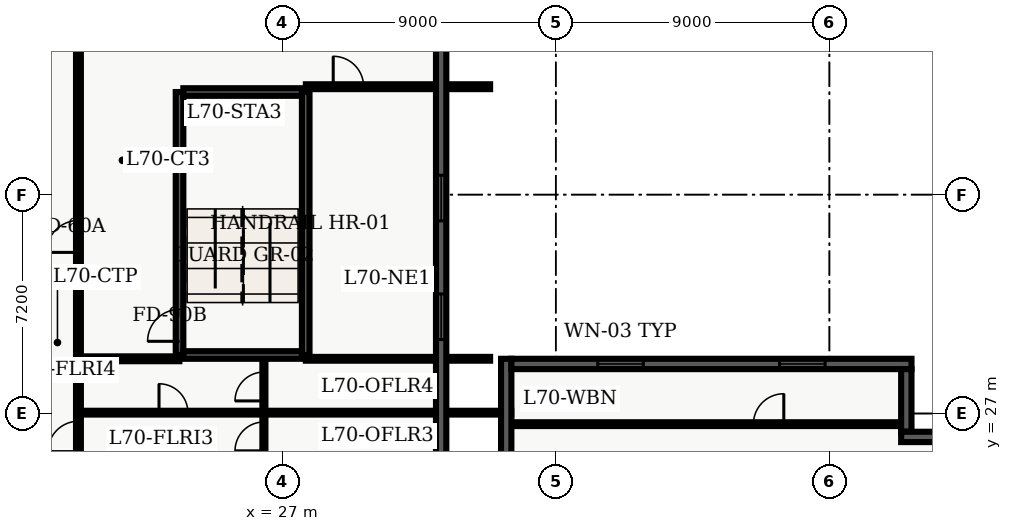
"""IFC4 building model, lengths in metres.
Left out: names, types, materials, properties, quantities, classifications, styles, units other than length and angle.
Written with IfcOpenShell. Run it as: python <this file> out.ifc"""

import sys

from ifc_helpers import new_model, entity, si_unit, converted_unit, direction, frame, origin_with_axes, origin_2d_with_axis, place, context, subcontext, project, spatial, polyline, rectangle, outline, extrude, element, fill, save


model = new_model("IFC4")
c1 = context("Model", 3, precision=1e-05, world=origin_with_axes(), true_north=direction((0.0, 1.0)))
c2 = subcontext(c1, "Body", "Model", "MODEL_VIEW")
j1 = project(units=[si_unit("LENGTHUNIT", "METRE"), converted_unit("PLANEANGLEUNIT", "DEGREE", entity("IfcPlaneAngleMeasure", 0.017), si_unit("PLANEANGLEUNIT", "RADIAN"), dimensions=[0, 0, 0, 0, 0, 0, 0])], contexts=[c1])
p1 = place(None, origin_with_axes())
s1 = spatial("IfcSite", under=j1, at=p1, CompositionType="ELEMENT")
p2 = place(p1, origin_with_axes())
s2 = spatial("IfcBuilding", under=s1, at=p2, CompositionType="ELEMENT")
p3 = place(p2, frame((0.0, 0.0, 284.1), z_axis=(0.0, 0.0, 1.0), x_axis=(1.0, 0.0, 0.0)))
s3 = spatial("IfcBuildingStorey", under=s2, at=p3, CompositionType="ELEMENT", Elevation=284.1)
p4 = place(p3, frame((23.625, 28.925, 0.0), z_axis=(0.0, 0.0, 1.0), x_axis=(0.0, 1.0, 0.0)))
e1 = element("IfcWall", 1, at=p4, inside=s3, PredefinedType="SHEAR", context=c2, shape_type="SweptSolid", body=[
    extrude(outline(polyline([(0.0, -0.125), (8.65, -0.125), (8.65, 0.125), (0.0, 0.125), (0.0, -0.125)])), origin_with_axes(), (0.0, 0.0, 1.0), 3.6),
])
p5 = place(p4, frame((0.975, 0.0, 0.0), z_axis=(0.0, 0.0, 1.0), x_axis=(1.0, 0.0, 0.0)))
e2 = element("IfcOpeningElement", 2, at=p5, cuts=e1, PredefinedType="OPENING", context=c2, shape_type="SweptSolid", body=[
    extrude(rectangle(XDim=1.05, YDim=0.27, at=origin_2d_with_axis()), origin_with_axes(), (0.0, 0.0, 1.0), 2.15),
])
p6 = place(p3, frame((27.775, 28.925, 0.0), z_axis=(0.0, 0.0, 1.0), x_axis=(0.0, 1.0, 0.0)))
e3 = element("IfcWall", 3, at=p6, inside=s3, PredefinedType="SHEAR", context=c2, shape_type="SweptSolid", body=[
    extrude(outline(polyline([(0.0, -0.125), (8.65, -0.125), (8.65, 0.125), (0.0, 0.125), (0.0, -0.125)])), origin_with_axes(), (0.0, 0.0, 1.0), 3.6),
])
for number, where, z_axis, x_axis in (
    (4, (23.75, 28.925, 0.0), (0.0, 0.0, 1.0), (1.0, 0.0, 0.0)),
    (5, (23.75, 37.575, 0.0), (0.0, 0.0, 1.0), (1.0, 0.0, 0.0)),
):
    element("IfcWall", number, at=place(p3, frame(where, z_axis=z_axis, x_axis=x_axis)), inside=s3, PredefinedType="SHEAR", context=c2, shape_type="SweptSolid", body=[
        extrude(outline(polyline([(0.0, -0.125), (3.9, -0.125), (3.9, 0.125), (0.0, 0.125), (0.0, -0.125)])), origin_with_axes(), (0.0, 0.0, 1.0), 3.6),
    ])
p7 = place(p3, frame((20.3, 7.8, 0.0), z_axis=(0.0, 0.0, 1.0), x_axis=(0.0, 1.0, 0.0)))
e6 = element("IfcWall", 6, at=p7, inside=s3, PredefinedType="PARTITIONING", context=c2, shape_type="SweptSolid", body=[
    extrude(outline(polyline([(0.0, -0.08), (32.7, -0.08), (32.7, 0.08), (0.0, 0.08), (0.0, -0.08)])), origin_with_axes(), (0.0, 0.0, 1.0), 2.64),
])
p8 = place(p7, frame((25.025, 0.0, 0.0), z_axis=(0.0, 0.0, 1.0), x_axis=(1.0, 0.0, 0.0)))
e7 = element("IfcOpeningElement", 7, at=p8, cuts=e6, PredefinedType="OPENING", context=c2, shape_type="SweptSolid", body=[
    extrude(rectangle(XDim=1.05, YDim=0.18, at=origin_2d_with_axis()), origin_with_axes(), (0.0, 0.0, 1.0), 2.15),
])
p9 = place(p7, frame((14.273, 0.0, 0.0), z_axis=(0.0, 0.0, 1.0), x_axis=(1.0, 0.0, 0.0)))
e8 = element("IfcOpeningElement", 8, at=p9, cuts=e6, PredefinedType="OPENING", context=c2, shape_type="SweptSolid", body=[
    extrude(rectangle(XDim=1.0, YDim=0.18, at=origin_2d_with_axis()), origin_with_axes(), (0.0, 0.0, 1.0), 2.15),
])
p10 = place(p7, frame((18.447, 0.0, 0.0), z_axis=(0.0, 0.0, 1.0), x_axis=(1.0, 0.0, 0.0)))
e9 = element("IfcOpeningElement", 9, at=p10, cuts=e6, PredefinedType="OPENING", context=c2, shape_type="SweptSolid", body=[
    extrude(rectangle(XDim=1.0, YDim=0.18, at=origin_2d_with_axis()), origin_with_axes(), (0.0, 0.0, 1.0), 2.15),
])
p11 = place(p7, frame((6.675, 0.0, 0.0), z_axis=(0.0, 0.0, 1.0), x_axis=(1.0, 0.0, 0.0)))
e10 = element("IfcOpeningElement", 10, at=p11, cuts=e6, PredefinedType="OPENING", context=c2, shape_type="SweptSolid", body=[
    extrude(rectangle(XDim=1.05, YDim=0.18, at=origin_2d_with_axis()), origin_with_axes(), (0.0, 0.0, 1.0), 2.15),
])
p12 = place(p3, frame((20.3, 28.8, 0.0), z_axis=(0.0, 0.0, 1.0), x_axis=(1.0, 0.0, 0.0)))
e11 = element("IfcWall", 11, at=p12, inside=s3, PredefinedType="PARTITIONING", context=c2, shape_type="SweptSolid", body=[
    extrude(outline(polyline([(0.0, -0.08), (3.32, -0.08), (3.32, 0.08), (0.0, 0.08), (0.0, -0.08)])), origin_with_axes(), (0.0, 0.0, 1.0), 2.64),
])
p13 = place(p3, frame((26.4, 21.42, 0.0), z_axis=(0.0, 0.0, 1.0), x_axis=(0.0, 1.0, 0.0)))
e12 = element("IfcWall", 12, at=p13, inside=s3, PredefinedType="PARTITIONING", context=c2, shape_type="SweptSolid", body=[
    extrude(outline(polyline([(0.0, -0.05), (7.26, -0.05), (7.26, 0.05), (0.0, 0.05), (0.0, -0.05)])), origin_with_axes(), (0.0, 0.0, 1.0), 2.64),
])
p14 = place(p13, frame((0.932, 0.0, 0.0), z_axis=(0.0, 0.0, 1.0), x_axis=(1.0, 0.0, 0.0)))
e13 = element("IfcOpeningElement", 13, at=p14, cuts=e12, PredefinedType="OPENING", context=c2, shape_type="SweptSolid", body=[
    extrude(rectangle(XDim=0.95, YDim=0.12, at=origin_2d_with_axis()), origin_with_axes(), (0.0, 0.0, 1.0), 2.15),
])
p15 = place(p13, frame((2.99, 0.0, 0.0), z_axis=(0.0, 0.0, 1.0), x_axis=(1.0, 0.0, 0.0)))
e14 = element("IfcOpeningElement", 14, at=p15, cuts=e12, PredefinedType="OPENING", context=c2, shape_type="SweptSolid", body=[
    extrude(rectangle(XDim=0.95, YDim=0.12, at=origin_2d_with_axis()), origin_with_axes(), (0.0, 0.0, 1.0), 2.15),
])
p16 = place(p13, frame((4.827, 0.0, 0.0), z_axis=(0.0, 0.0, 1.0), x_axis=(1.0, 0.0, 0.0)))
e15 = element("IfcOpeningElement", 15, at=p16, cuts=e12, PredefinedType="OPENING", context=c2, shape_type="SweptSolid", body=[
    extrude(rectangle(XDim=0.95, YDim=0.12, at=origin_2d_with_axis()), origin_with_axes(), (0.0, 0.0, 1.0), 2.15),
])
p17 = place(p13, frame((6.469, 0.0, 0.0), z_axis=(0.0, 0.0, 1.0), x_axis=(1.0, 0.0, 0.0)))
e16 = element("IfcOpeningElement", 16, at=p17, cuts=e12, PredefinedType="OPENING", context=c2, shape_type="SweptSolid", body=[
    extrude(rectangle(XDim=0.95, YDim=0.12, at=origin_2d_with_axis()), origin_with_axes(), (0.0, 0.0, 1.0), 2.15),
])
p18 = place(p3, frame((20.45, 27.028, 0.0), z_axis=(0.0, 0.0, 1.0), x_axis=(1.0, 0.0, 0.0)))
e17 = element("IfcWall", 17, at=p18, inside=s3, PredefinedType="PARTITIONING", context=c2, shape_type="SweptSolid", body=[
    extrude(outline(polyline([(0.0, -0.062), (14.085, -0.062), (14.085, 0.062), (0.0, 0.062), (0.0, -0.062)])), origin_with_axes(), (0.0, 0.0, 1.0), 2.64),
])
p19 = place(p18, frame((2.975, 0.0, 0.0), z_axis=(0.0, 0.0, 1.0), x_axis=(1.0, 0.0, 0.0)))
e18 = element("IfcOpeningElement", 18, at=p19, cuts=e17, PredefinedType="OPENING", context=c2, shape_type="SweptSolid", body=[
    extrude(rectangle(XDim=0.95, YDim=0.145, at=origin_2d_with_axis()), origin_with_axes(), (0.0, 0.0, 1.0), 2.15),
])
p20 = place(p3, frame((27.78, 28.8, 0.0), z_axis=(0.0, 0.0, 1.0), x_axis=(1.0, 0.0, 0.0)))
e19 = element("IfcWall", 19, at=p20, inside=s3, PredefinedType="PARTITIONING", context=c2, shape_type="SweptSolid", body=[
    extrude(outline(polyline([(0.0, -0.062), (6.06, -0.062), (6.06, 0.062), (0.0, 0.062), (0.0, -0.062)])), origin_with_axes(), (0.0, 0.0, 1.0), 2.64),
])
p21 = place(p3, frame((27.78, 37.75, 0.0), z_axis=(0.0, 0.0, 1.0), x_axis=(1.0, 0.0, 0.0)))
e20 = element("IfcWall", 20, at=p21, inside=s3, PredefinedType="PARTITIONING", context=c2, shape_type="SweptSolid", body=[
    extrude(outline(polyline([(0.0, -0.08), (6.06, -0.08), (6.06, 0.08), (0.0, 0.08), (0.0, -0.08)])), origin_with_axes(), (0.0, 0.0, 1.0), 2.64),
])
p22 = place(p21, frame((1.4, 0.0, 0.0), z_axis=(0.0, 0.0, 1.0), x_axis=(1.0, 0.0, 0.0)))
e21 = element("IfcOpeningElement", 21, at=p22, cuts=e20, PredefinedType="OPENING", context=c2, shape_type="SweptSolid", body=[
    extrude(rectangle(XDim=1.0, YDim=0.18, at=origin_2d_with_axis()), origin_with_axes(), (0.0, 0.0, 1.0), 2.15),
])
p23 = place(p3, frame((34.535, 26.65, 0.0), z_axis=(0.0, 0.0, 1.0), x_axis=(1.0, 0.0, 0.0)))
e22 = element("IfcWall", 22, at=p23, inside=s3, PredefinedType="PARTITIONING", context=c2, shape_type="SweptSolid", body=[
    extrude(outline(polyline([(0.0, -0.062), (12.995, -0.062), (12.995, 0.062), (0.0, 0.062), (0.0, -0.062)])), origin_with_axes(), (0.0, 0.0, 1.0), 2.64),
])
p24 = place(p23, frame((8.465, 0.0, 0.0), z_axis=(0.0, 0.0, 1.0), x_axis=(1.0, 0.0, 0.0)))
e23 = element("IfcOpeningElement", 23, at=p24, cuts=e22, PredefinedType="OPENING", context=c2, shape_type="SweptSolid", body=[
    extrude(rectangle(XDim=1.0, YDim=0.145, at=origin_2d_with_axis()), origin_with_axes(), (0.0, 0.0, 1.0), 2.15),
])
p25 = place(p3, frame((34.37, 21.26, 0.0), z_axis=(0.0, 0.0, 1.0), x_axis=(0.0, 1.0, 0.0)))
e24 = element("IfcWall", 24, at=p25, inside=s3, PredefinedType="SOLIDWALL", context=c2, shape_type="SweptSolid", body=[
    extrude(outline(polyline([(0.0, -0.17), (7.54, -0.17), (7.54, 0.17), (0.0, 0.17), (0.0, -0.17)])), origin_with_axes(), (0.0, 0.0, 1.0), 3.6),
])
p26 = place(p3, frame((34.54, 28.63, 0.0), z_axis=(0.0, 0.0, 1.0), x_axis=(1.0, 0.0, 0.0)))
e25 = element("IfcWall", 25, at=p26, inside=s3, PredefinedType="SOLIDWALL", context=c2, shape_type="SweptSolid", body=[
    extrude(outline(polyline([(0.0, -0.17), (13.16, -0.17), (13.16, 0.17), (0.0, 0.17), (0.0, -0.17)])), origin_with_axes(), (0.0, 0.0, 1.0), 3.6),
])
p27 = place(p26, frame((3.59, 0.0, 0.45), z_axis=(0.0, 0.0, 1.0), x_axis=(1.0, 0.0, 0.0)))
e26 = element("IfcOpeningElement", 26, at=p27, cuts=e25, PredefinedType="OPENING", context=c2, shape_type="SweptSolid", body=[
    extrude(rectangle(XDim=1.5, YDim=0.36, at=origin_2d_with_axis()), origin_with_axes(), (0.0, 0.0, 1.0), 2.1),
])
p28 = place(p26, frame((9.57, 0.0, 0.45), z_axis=(0.0, 0.0, 1.0), x_axis=(1.0, 0.0, 0.0)))
e27 = element("IfcOpeningElement", 27, at=p28, cuts=e25, PredefinedType="OPENING", context=c2, shape_type="SweptSolid", body=[
    extrude(rectangle(XDim=1.5, YDim=0.36, at=origin_2d_with_axis()), origin_with_axes(), (0.0, 0.0, 1.0), 2.1),
])
p29 = place(p3, frame((47.53, 28.46, 0.0), z_axis=(0.0, 0.0, 1.0), x_axis=(0.0, -1.0, 0.0)))
e28 = element("IfcWall", 28, at=p29, inside=s3, PredefinedType="SOLIDWALL", context=c2, shape_type="SweptSolid", body=[
    extrude(outline(polyline([(0.0, -0.17), (2.06, -0.17), (2.06, 0.17), (0.0, 0.17), (0.0, -0.17)])), origin_with_axes(), (0.0, 0.0, 1.0), 3.6),
])
p30 = place(p3, frame((47.36, 26.23, 0.0), z_axis=(0.0, 0.0, 1.0), x_axis=(1.0, 0.0, 0.0)))
e29 = element("IfcWall", 29, at=p30, inside=s3, PredefinedType="SOLIDWALL", context=c2, shape_type="SweptSolid", body=[
    extrude(outline(polyline([(0.0, -0.17), (2.74, -0.17), (2.74, 0.17), (0.0, 0.17), (0.0, -0.17)])), origin_with_axes(), (0.0, 0.0, 1.0), 3.6),
])
p31 = place(p3, frame((32.23, 41.82, 0.0), z_axis=(0.0, 0.0, 1.0), x_axis=(0.0, -1.0, 0.0)))
e30 = element("IfcWall", 30, at=p31, inside=s3, PredefinedType="SOLIDWALL", context=c2, shape_type="SweptSolid", body=[
    extrude(outline(polyline([(0.0, -0.17), (20.22, -0.17), (20.22, 0.17), (0.0, 0.17), (0.0, -0.17)])), origin_with_axes(), (0.0, 0.0, 1.0), 3.6),
])
p32 = place(p31, frame((7.732, 0.0, 0.45), z_axis=(0.0, 0.0, 1.0), x_axis=(1.0, 0.0, 0.0)))
e31 = element("IfcOpeningElement", 31, at=p32, cuts=e30, PredefinedType="OPENING", context=c2, shape_type="SweptSolid", body=[
    extrude(rectangle(XDim=1.5, YDim=0.36, at=origin_2d_with_axis()), origin_with_axes(), (0.0, 0.0, 1.0), 2.1),
])
p33 = place(p31, frame((11.637, 0.0, 0.45), z_axis=(0.0, 0.0, 1.0), x_axis=(1.0, 0.0, 0.0)))
e32 = element("IfcOpeningElement", 32, at=p33, cuts=e30, PredefinedType="OPENING", context=c2, shape_type="SweptSolid", body=[
    extrude(rectangle(XDim=1.5, YDim=0.36, at=origin_2d_with_axis()), origin_with_axes(), (0.0, 0.0, 1.0), 2.1),
])
p34 = place(p4, frame((0.975, 0.0, 0.0), z_axis=(0.0, 0.0, 1.0), x_axis=(1.0, 0.0, 0.0)))
e33 = element("IfcDoor", 33, at=p34, inside=s3, OperationType="SINGLE_SWING_LEFT", PredefinedType="DOOR", context=c2, shape_type="SweptSolid", body=[
    extrude(rectangle(XDim=1.05, YDim=0.09, at=origin_2d_with_axis()), origin_with_axes(), (0.0, 0.0, 1.0), 2.15),
])
fill(e2, e33)
p35 = place(p7, frame((25.025, 0.0, 0.0), z_axis=(0.0, 0.0, 1.0), x_axis=(1.0, 0.0, 0.0)))
e34 = element("IfcDoor", 34, at=p35, inside=s3, OperationType="SINGLE_SWING_LEFT", PredefinedType="DOOR", context=c2, shape_type="SweptSolid", body=[
    extrude(rectangle(XDim=1.05, YDim=0.09, at=origin_2d_with_axis()), origin_with_axes(), (0.0, 0.0, 1.0), 2.15),
])
fill(e7, e34)
p36 = place(p13, frame((4.827, 0.0, 0.0), z_axis=(0.0, 0.0, 1.0), x_axis=(1.0, 0.0, 0.0)))
e35 = element("IfcDoor", 35, at=p36, inside=s3, OperationType="SINGLE_SWING_LEFT", PredefinedType="DOOR", context=c2, shape_type="SweptSolid", body=[
    extrude(rectangle(XDim=0.95, YDim=0.06, at=origin_2d_with_axis()), origin_with_axes(), (0.0, 0.0, 1.0), 2.15),
])
fill(e15, e35)
p37 = place(p7, frame((18.447, 0.0, 0.0), z_axis=(0.0, 0.0, 1.0), x_axis=(1.0, 0.0, 0.0)))
e36 = element("IfcDoor", 36, at=p37, inside=s3, OperationType="SINGLE_SWING_LEFT", PredefinedType="DOOR", context=c2, shape_type="SweptSolid", body=[
    extrude(rectangle(XDim=1.0, YDim=0.09, at=origin_2d_with_axis()), origin_with_axes(), (0.0, 0.0, 1.0), 2.15),
])
fill(e9, e36)
p38 = place(p13, frame((6.469, 0.0, 0.0), z_axis=(0.0, 0.0, 1.0), x_axis=(1.0, 0.0, 0.0)))
e37 = element("IfcDoor", 37, at=p38, inside=s3, OperationType="SINGLE_SWING_LEFT", PredefinedType="DOOR", context=c2, shape_type="SweptSolid", body=[
    extrude(rectangle(XDim=0.95, YDim=0.06, at=origin_2d_with_axis()), origin_with_axes(), (0.0, 0.0, 1.0), 2.15),
])
fill(e16, e37)
p39 = place(p18, frame((2.975, 0.0, 0.0), z_axis=(0.0, 0.0, 1.0), x_axis=(1.0, 0.0, 0.0)))
e38 = element("IfcDoor", 38, at=p39, inside=s3, OperationType="SINGLE_SWING_LEFT", PredefinedType="DOOR", context=c2, shape_type="SweptSolid", body=[
    extrude(rectangle(XDim=0.95, YDim=0.075, at=origin_2d_with_axis()), origin_with_axes(), (0.0, 0.0, 1.0), 2.15),
])
fill(e18, e38)
p40 = place(p21, frame((1.4, 0.0, 0.0), z_axis=(0.0, 0.0, 1.0), x_axis=(1.0, 0.0, 0.0)))
e39 = element("IfcDoor", 39, at=p40, inside=s3, OperationType="SINGLE_SWING_LEFT", PredefinedType="DOOR", context=c2, shape_type="SweptSolid", body=[
    extrude(rectangle(XDim=1.0, YDim=0.09, at=origin_2d_with_axis()), origin_with_axes(), (0.0, 0.0, 1.0), 2.15),
])
fill(e21, e39)
p41 = place(p23, frame((8.465, 0.0, 0.0), z_axis=(0.0, 0.0, 1.0), x_axis=(1.0, 0.0, 0.0)))
e40 = element("IfcDoor", 40, at=p41, inside=s3, OperationType="SINGLE_SWING_RIGHT", PredefinedType="DOOR", context=c2, shape_type="SweptSolid", body=[
    extrude(rectangle(XDim=1.0, YDim=0.075, at=origin_2d_with_axis()), origin_with_axes(), (0.0, 0.0, 1.0), 2.15),
])
fill(e23, e40)
p42 = place(p26, frame((3.59, 0.0, 0.45), z_axis=(0.0, 0.0, 1.0), x_axis=(1.0, 0.0, 0.0)))
e41 = element("IfcWindow", 41, at=p42, inside=s3, PredefinedType="WINDOW", context=c2, shape_type="SweptSolid", body=[
    extrude(rectangle(XDim=1.5, YDim=0.09, at=origin_2d_with_axis()), origin_with_axes(), (0.0, 0.0, 1.0), 2.1),
])
fill(e26, e41)
p43 = place(p26, frame((9.57, 0.0, 0.45), z_axis=(0.0, 0.0, 1.0), x_axis=(1.0, 0.0, 0.0)))
e42 = element("IfcWindow", 42, at=p43, inside=s3, PredefinedType="WINDOW", context=c2, shape_type="SweptSolid", body=[
    extrude(rectangle(XDim=1.5, YDim=0.09, at=origin_2d_with_axis()), origin_with_axes(), (0.0, 0.0, 1.0), 2.1),
])
fill(e27, e42)
p44 = place(p31, frame((7.732, 0.0, 0.45), z_axis=(0.0, 0.0, 1.0), x_axis=(1.0, 0.0, 0.0)))
e43 = element("IfcWindow", 43, at=p44, inside=s3, PredefinedType="WINDOW", context=c2, shape_type="SweptSolid", body=[
    extrude(rectangle(XDim=1.5, YDim=0.09, at=origin_2d_with_axis()), origin_with_axes(), (0.0, 0.0, 1.0), 2.1),
])
fill(e31, e43)
p45 = place(p31, frame((11.637, 0.0, 0.45), z_axis=(0.0, 0.0, 1.0), x_axis=(1.0, 0.0, 0.0)))
e44 = element("IfcWindow", 44, at=p45, inside=s3, PredefinedType="WINDOW", context=c2, shape_type="SweptSolid", body=[
    extrude(rectangle(XDim=1.5, YDim=0.09, at=origin_2d_with_axis()), origin_with_axes(), (0.0, 0.0, 1.0), 2.1),
])
fill(e32, e44)
save(model, sys.argv[1])
